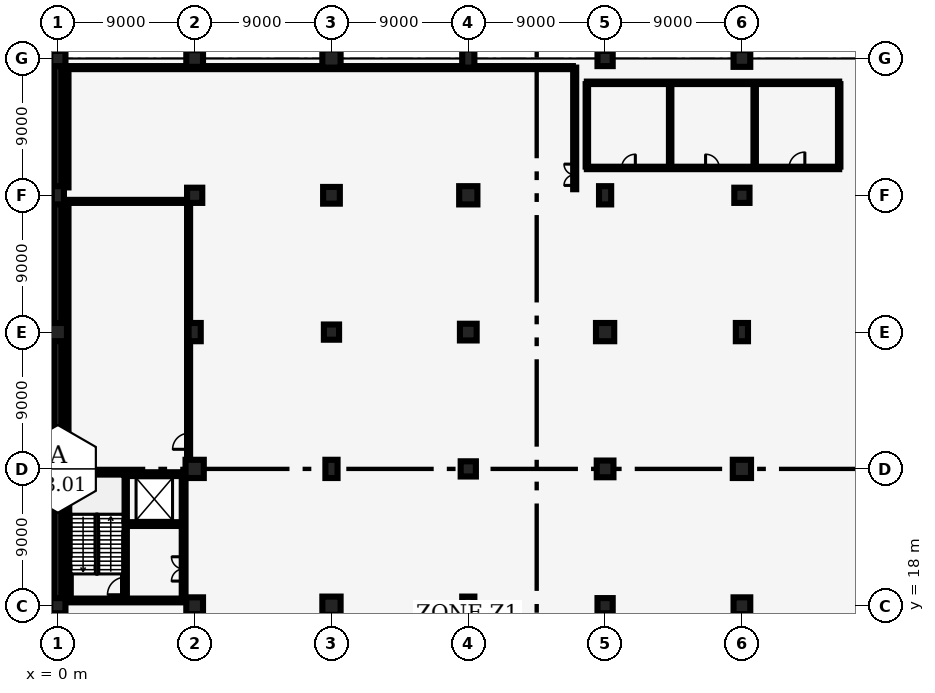
"""IFC4 building model, lengths in metres.
Left out: names, types, materials, properties, quantities, classifications, styles, units other than length and angle.
Written with IfcOpenShell. Run it as: python <this file> out.ifc"""

import sys

from ifc_helpers import new_model, si_unit, direction, frame, frame_2d, origin, origin_2d, place, context, subcontext, project, spatial, rectangle, extrude, element, fill, save


model = new_model("IFC4")
c1 = context("Model", 3, precision=1e-05, world=origin(), true_north=direction((0.0, 1.0)))
c2 = subcontext(c1, "Body", "Model", "MODEL_VIEW")
j1 = project(units=[si_unit("LENGTHUNIT", "METRE"), si_unit("PLANEANGLEUNIT", "RADIAN")], contexts=[c1])
p1 = place(None, origin())
s1 = spatial("IfcSite", under=j1, at=p1, CompositionType="ELEMENT")
p2 = place(p1, origin())
s2 = spatial("IfcBuilding", under=s1, at=p2, CompositionType="ELEMENT")
p3 = place(p2, frame((0.0, 0.0, -5.0)))
s3 = spatial("IfcBuildingStorey", under=s2, at=p3, CompositionType="ELEMENT", Elevation=-5.0)
p4 = place(p3, frame((0.0, 18.0, 0.0), z_axis=(0.0, 0.0, 1.0), x_axis=(1.0, 0.0, 0.0)))
e1 = element("IfcColumn", 1, at=p4, inside=s3, PredefinedType="COLUMN", context=c2, shape_type="SweptSolid", body=[
    extrude(rectangle(XDim=1.0, YDim=1.0, at=origin_2d()), origin(), (0.0, 0.0, 1.0), 5.0),
])
p5 = place(p3, frame((0.0, 27.0, 0.0), z_axis=(0.0, 0.0, 1.0), x_axis=(1.0, 0.0, 0.0)))
e2 = element("IfcColumn", 2, at=p5, inside=s3, PredefinedType="COLUMN", context=c2, shape_type="SweptSolid", body=[
    extrude(rectangle(XDim=1.1, YDim=1.1, at=origin_2d()), origin(), (0.0, 0.0, 1.0), 5.0),
])
p6 = place(p3, frame((0.0, 36.0, 0.0), z_axis=(0.0, 0.0, 1.0), x_axis=(1.0, 0.0, 0.0)))
e3 = element("IfcColumn", 3, at=p6, inside=s3, PredefinedType="COLUMN", context=c2, shape_type="SweptSolid", body=[
    extrude(rectangle(XDim=1.2, YDim=1.2, at=origin_2d()), origin(), (0.0, 0.0, 1.0), 5.0),
])
p7 = place(p3, frame((0.0, 45.0, 0.0), z_axis=(0.0, 0.0, 1.0), x_axis=(1.0, 0.0, 0.0)))
e4 = element("IfcColumn", 4, at=p7, inside=s3, PredefinedType="COLUMN", context=c2, shape_type="SweptSolid", body=[
    extrude(rectangle(XDim=0.8, YDim=1.2, at=origin_2d()), origin(), (0.0, 0.0, 1.0), 5.0),
])
p8 = place(p3, frame((0.0, 54.0, 0.0), z_axis=(0.0, 0.0, 1.0), x_axis=(1.0, 0.0, 0.0)))
e5 = element("IfcColumn", 5, at=p8, inside=s3, PredefinedType="COLUMN", context=c2, shape_type="SweptSolid", body=[
    extrude(rectangle(XDim=1.0, YDim=1.0, at=origin_2d()), origin(), (0.0, 0.0, 1.0), 5.0),
])
p9 = place(p3, frame((9.0, 18.0, 0.0), z_axis=(0.0, 0.0, 1.0), x_axis=(1.0, 0.0, 0.0)))
e6 = element("IfcColumn", 6, at=p9, inside=s3, PredefinedType="COLUMN", context=c2, shape_type="SweptSolid", body=[
    extrude(rectangle(XDim=1.1, YDim=1.1, at=origin_2d()), origin(), (0.0, 0.0, 1.0), 5.0),
])
p10 = place(p3, frame((9.0, 27.0, 0.0), z_axis=(0.0, 0.0, 1.0), x_axis=(1.0, 0.0, 0.0)))
e7 = element("IfcColumn", 7, at=p10, inside=s3, PredefinedType="COLUMN", context=c2, shape_type="SweptSolid", body=[
    extrude(rectangle(XDim=1.2, YDim=1.2, at=origin_2d()), origin(), (0.0, 0.0, 1.0), 5.0),
])
p11 = place(p3, frame((9.0, 36.0, 0.0), z_axis=(0.0, 0.0, 1.0), x_axis=(1.0, 0.0, 0.0)))
e8 = element("IfcColumn", 8, at=p11, inside=s3, PredefinedType="COLUMN", context=c2, shape_type="SweptSolid", body=[
    extrude(rectangle(XDim=0.8, YDim=1.2, at=origin_2d()), origin(), (0.0, 0.0, 1.0), 5.0),
])
p12 = place(p3, frame((9.0, 45.0, 0.0), z_axis=(0.0, 0.0, 1.0), x_axis=(1.0, 0.0, 0.0)))
e9 = element("IfcColumn", 9, at=p12, inside=s3, PredefinedType="COLUMN", context=c2, shape_type="SweptSolid", body=[
    extrude(rectangle(XDim=1.0, YDim=1.0, at=origin_2d()), origin(), (0.0, 0.0, 1.0), 5.0),
])
p13 = place(p3, frame((9.0, 54.0, 0.0), z_axis=(0.0, 0.0, 1.0), x_axis=(1.0, 0.0, 0.0)))
e10 = element("IfcColumn", 10, at=p13, inside=s3, PredefinedType="COLUMN", context=c2, shape_type="SweptSolid", body=[
    extrude(rectangle(XDim=1.1, YDim=1.1, at=origin_2d()), origin(), (0.0, 0.0, 1.0), 5.0),
])
p14 = place(p3, frame((18.0, 18.0, 0.0), z_axis=(0.0, 0.0, 1.0), x_axis=(1.0, 0.0, 0.0)))
e11 = element("IfcColumn", 11, at=p14, inside=s3, PredefinedType="COLUMN", context=c2, shape_type="SweptSolid", body=[
    extrude(rectangle(XDim=1.2, YDim=1.2, at=origin_2d()), origin(), (0.0, 0.0, 1.0), 5.0),
])
p15 = place(p3, frame((18.0, 27.0, 0.0), z_axis=(0.0, 0.0, 1.0), x_axis=(1.0, 0.0, 0.0)))
e12 = element("IfcColumn", 12, at=p15, inside=s3, PredefinedType="COLUMN", context=c2, shape_type="SweptSolid", body=[
    extrude(rectangle(XDim=0.8, YDim=1.2, at=origin_2d()), origin(), (0.0, 0.0, 1.0), 5.0),
])
p16 = place(p3, frame((18.0, 36.0, 0.0), z_axis=(0.0, 0.0, 1.0), x_axis=(1.0, 0.0, 0.0)))
e13 = element("IfcColumn", 13, at=p16, inside=s3, PredefinedType="COLUMN", context=c2, shape_type="SweptSolid", body=[
    extrude(rectangle(XDim=1.0, YDim=1.0, at=origin_2d()), origin(), (0.0, 0.0, 1.0), 5.0),
])
p17 = place(p3, frame((18.0, 45.0, 0.0), z_axis=(0.0, 0.0, 1.0), x_axis=(1.0, 0.0, 0.0)))
e14 = element("IfcColumn", 14, at=p17, inside=s3, PredefinedType="COLUMN", context=c2, shape_type="SweptSolid", body=[
    extrude(rectangle(XDim=1.1, YDim=1.1, at=origin_2d()), origin(), (0.0, 0.0, 1.0), 5.0),
])
p18 = place(p3, frame((18.0, 54.0, 0.0), z_axis=(0.0, 0.0, 1.0), x_axis=(1.0, 0.0, 0.0)))
e15 = element("IfcColumn", 15, at=p18, inside=s3, PredefinedType="COLUMN", context=c2, shape_type="SweptSolid", body=[
    extrude(rectangle(XDim=1.2, YDim=1.2, at=origin_2d()), origin(), (0.0, 0.0, 1.0), 5.0),
])
p19 = place(p3, frame((27.0, 18.0, 0.0), z_axis=(0.0, 0.0, 1.0), x_axis=(1.0, 0.0, 0.0)))
e16 = element("IfcColumn", 16, at=p19, inside=s3, PredefinedType="COLUMN", context=c2, shape_type="SweptSolid", body=[
    extrude(rectangle(XDim=0.8, YDim=1.2, at=origin_2d()), origin(), (0.0, 0.0, 1.0), 5.0),
])
p20 = place(p3, frame((27.0, 27.0, 0.0), z_axis=(0.0, 0.0, 1.0), x_axis=(1.0, 0.0, 0.0)))
e17 = element("IfcColumn", 17, at=p20, inside=s3, PredefinedType="COLUMN", context=c2, shape_type="SweptSolid", body=[
    extrude(rectangle(XDim=1.0, YDim=1.0, at=origin_2d()), origin(), (0.0, 0.0, 1.0), 4.66),
])
p21 = place(p3, frame((27.0, 36.0, 0.0), z_axis=(0.0, 0.0, 1.0), x_axis=(1.0, 0.0, 0.0)))
e18 = element("IfcColumn", 18, at=p21, inside=s3, PredefinedType="COLUMN", context=c2, shape_type="SweptSolid", body=[
    extrude(rectangle(XDim=1.1, YDim=1.1, at=origin_2d()), origin(), (0.0, 0.0, 1.0), 4.66),
])
p22 = place(p3, frame((27.0, 45.0, 0.0), z_axis=(0.0, 0.0, 1.0), x_axis=(1.0, 0.0, 0.0)))
e19 = element("IfcColumn", 19, at=p22, inside=s3, PredefinedType="COLUMN", context=c2, shape_type="SweptSolid", body=[
    extrude(rectangle(XDim=1.2, YDim=1.2, at=origin_2d()), origin(), (0.0, 0.0, 1.0), 5.0),
])
p23 = place(p3, frame((27.0, 54.0, 0.0), z_axis=(0.0, 0.0, 1.0), x_axis=(1.0, 0.0, 0.0)))
e20 = element("IfcColumn", 20, at=p23, inside=s3, PredefinedType="COLUMN", context=c2, shape_type="SweptSolid", body=[
    extrude(rectangle(XDim=0.8, YDim=1.2, at=origin_2d()), origin(), (0.0, 0.0, 1.0), 5.0),
])
p24 = place(p3, frame((36.0, 18.0, 0.0), z_axis=(0.0, 0.0, 1.0), x_axis=(1.0, 0.0, 0.0)))
e21 = element("IfcColumn", 21, at=p24, inside=s3, PredefinedType="COLUMN", context=c2, shape_type="SweptSolid", body=[
    extrude(rectangle(XDim=1.0, YDim=1.0, at=origin_2d()), origin(), (0.0, 0.0, 1.0), 5.0),
])
p25 = place(p3, frame((36.0, 27.0, 0.0), z_axis=(0.0, 0.0, 1.0), x_axis=(1.0, 0.0, 0.0)))
e22 = element("IfcColumn", 22, at=p25, inside=s3, PredefinedType="COLUMN", context=c2, shape_type="SweptSolid", body=[
    extrude(rectangle(XDim=1.1, YDim=1.1, at=origin_2d()), origin(), (0.0, 0.0, 1.0), 4.66),
])
p26 = place(p3, frame((36.0, 36.0, 0.0), z_axis=(0.0, 0.0, 1.0), x_axis=(1.0, 0.0, 0.0)))
e23 = element("IfcColumn", 23, at=p26, inside=s3, PredefinedType="COLUMN", context=c2, shape_type="SweptSolid", body=[
    extrude(rectangle(XDim=1.2, YDim=1.2, at=origin_2d()), origin(), (0.0, 0.0, 1.0), 4.66),
])
p27 = place(p3, frame((36.0, 45.0, 0.0), z_axis=(0.0, 0.0, 1.0), x_axis=(1.0, 0.0, 0.0)))
e24 = element("IfcColumn", 24, at=p27, inside=s3, PredefinedType="COLUMN", context=c2, shape_type="SweptSolid", body=[
    extrude(rectangle(XDim=0.8, YDim=1.2, at=origin_2d()), origin(), (0.0, 0.0, 1.0), 5.0),
])
p28 = place(p3, frame((36.0, 54.0, 0.0), z_axis=(0.0, 0.0, 1.0), x_axis=(1.0, 0.0, 0.0)))
e25 = element("IfcColumn", 25, at=p28, inside=s3, PredefinedType="COLUMN", context=c2, shape_type="SweptSolid", body=[
    extrude(rectangle(XDim=1.0, YDim=1.0, at=origin_2d()), origin(), (0.0, 0.0, 1.0), 5.0),
])
p29 = place(p3, frame((45.0, 18.0, 0.0), z_axis=(0.0, 0.0, 1.0), x_axis=(1.0, 0.0, 0.0)))
e26 = element("IfcColumn", 26, at=p29, inside=s3, PredefinedType="COLUMN", context=c2, shape_type="SweptSolid", body=[
    extrude(rectangle(XDim=1.1, YDim=1.1, at=origin_2d()), origin(), (0.0, 0.0, 1.0), 5.0),
])
p30 = place(p3, frame((45.0, 27.0, 0.0), z_axis=(0.0, 0.0, 1.0), x_axis=(1.0, 0.0, 0.0)))
e27 = element("IfcColumn", 27, at=p30, inside=s3, PredefinedType="COLUMN", context=c2, shape_type="SweptSolid", body=[
    extrude(rectangle(XDim=1.2, YDim=1.2, at=origin_2d()), origin(), (0.0, 0.0, 1.0), 4.66),
])
p31 = place(p3, frame((45.0, 36.0, 0.0), z_axis=(0.0, 0.0, 1.0), x_axis=(1.0, 0.0, 0.0)))
e28 = element("IfcColumn", 28, at=p31, inside=s3, PredefinedType="COLUMN", context=c2, shape_type="SweptSolid", body=[
    extrude(rectangle(XDim=0.8, YDim=1.2, at=origin_2d()), origin(), (0.0, 0.0, 1.0), 4.66),
])
p32 = place(p3, frame((45.0, 45.0, 0.0), z_axis=(0.0, 0.0, 1.0), x_axis=(1.0, 0.0, 0.0)))
e29 = element("IfcColumn", 29, at=p32, inside=s3, PredefinedType="COLUMN", context=c2, shape_type="SweptSolid", body=[
    extrude(rectangle(XDim=1.0, YDim=1.0, at=origin_2d()), origin(), (0.0, 0.0, 1.0), 5.0),
])
p33 = place(p3, frame((45.0, 54.0, 0.0), z_axis=(0.0, 0.0, 1.0), x_axis=(1.0, 0.0, 0.0)))
e30 = element("IfcColumn", 30, at=p33, inside=s3, PredefinedType="COLUMN", context=c2, shape_type="SweptSolid", body=[
    extrude(rectangle(XDim=1.1, YDim=1.1, at=origin_2d()), origin(), (0.0, 0.0, 1.0), 5.0),
])
p34 = place(p3, frame((0.0, 0.595, 0.0), z_axis=(0.0, 0.0, 1.0), x_axis=(0.0, 1.0, 0.0)))
e31 = element("IfcWall", 31, at=p34, inside=s3, PredefinedType="SHEAR", context=c2, shape_type="SweptSolid", body=[
    extrude(rectangle(XDim=52.91, YDim=0.45, at=frame_2d((26.455, 0.0))), origin(), (0.0, 0.0, 1.0), 3.95),
])
p35 = place(p3, frame((0.725, 18.47, 0.0), z_axis=(0.0, 0.0, 1.0), x_axis=(0.0, 1.0, 0.0)))
e32 = element("IfcWall", 32, at=p35, inside=s3, PredefinedType="SHEAR", context=c2, shape_type="SweptSolid", body=[
    extrude(rectangle(XDim=8.06, YDim=0.25, at=frame_2d((4.03, 0.0))), origin(), (0.0, 0.0, 1.0), 4.66),
])
p36 = place(p3, frame((8.275, 18.47, 0.0), z_axis=(0.0, 0.0, 1.0), x_axis=(0.0, 1.0, 0.0)))
e33 = element("IfcWall", 33, at=p36, inside=s3, PredefinedType="SHEAR", context=c2, shape_type="SweptSolid", body=[
    extrude(rectangle(XDim=8.06, YDim=0.25, at=frame_2d((4.03, 0.0))), origin(), (0.0, 0.0, 1.0), 4.66),
])
p37 = place(p36, frame((1.15, 0.0, 0.0)))
e34 = element("IfcOpeningElement", 34, at=p37, cuts=e33, PredefinedType="OPENING", context=c2, shape_type="SweptSolid", body=[
    extrude(rectangle(XDim=1.6, YDim=2.2, at=frame_2d((0.8, 1.1))), frame((0.0, 0.135, 0.0), z_axis=(0.0, -1.0, 0.0), x_axis=(1.0, 0.0, 0.0)), (0.0, 0.0, 1.0), 0.27),
])
for number, where, z_axis, x_axis in (
    (35, (0.6, 18.345, 0.0), (0.0, 0.0, 1.0), (1.0, 0.0, 0.0)),
    (36, (0.6, 26.655, 0.0), (0.0, 0.0, 1.0), (1.0, 0.0, 0.0)),
):
    element("IfcWall", number, at=place(p3, frame(where, z_axis=z_axis, x_axis=x_axis)), inside=s3, PredefinedType="SHEAR", context=c2, shape_type="SweptSolid", body=[
        extrude(rectangle(XDim=7.8, YDim=0.25, at=frame_2d((3.9, 0.0))), origin(), (0.0, 0.0, 1.0), 4.66),
    ])
p38 = place(p3, frame((4.415, 18.47, 0.0), z_axis=(0.0, 0.0, 1.0), x_axis=(0.0, 1.0, 0.0)))
e37 = element("IfcWall", 37, at=p38, inside=s3, PredefinedType="SHEAR", context=c2, shape_type="SweptSolid", body=[
    extrude(rectangle(XDim=8.06, YDim=0.25, at=frame_2d((4.03, 0.0))), origin(), (0.0, 0.0, 1.0), 4.66),
])
p39 = place(p38, frame((0.25, 0.0, 0.0)))
e38 = element("IfcOpeningElement", 38, at=p39, cuts=e37, PredefinedType="OPENING", context=c2, shape_type="SweptSolid", body=[
    extrude(rectangle(XDim=1.15, YDim=2.15, at=frame_2d((0.575, 1.075))), frame((0.0, 0.135, 0.0), z_axis=(0.0, -1.0, 0.0), x_axis=(1.0, 0.0, 0.0)), (0.0, 0.0, 1.0), 0.27),
])
p40 = place(p3, frame((4.54, 23.37, 0.0), z_axis=(0.0, 0.0, 1.0), x_axis=(1.0, 0.0, 0.0)))
e39 = element("IfcWall", 39, at=p40, inside=s3, PredefinedType="SHEAR", context=c2, shape_type="SweptSolid", body=[
    extrude(rectangle(XDim=3.61, YDim=0.25, at=frame_2d((1.805, 0.0))), origin(), (0.0, 0.0, 1.0), 4.66),
])
p41 = place(p40, frame((0.5, 0.0, 0.0)))
e40 = element("IfcOpeningElement", 40, at=p41, cuts=e39, PredefinedType="OPENING", context=c2, shape_type="SweptSolid", body=[
    extrude(rectangle(XDim=2.2, YDim=2.4, at=frame_2d((1.1, 1.2))), frame((0.0, 0.135, 0.0), z_axis=(0.0, -1.0, 0.0), x_axis=(1.0, 0.0, 0.0)), (0.0, 0.0, 1.0), 0.27),
])
p42 = place(p3, frame((34.8, 46.8, 0.0), z_axis=(0.0, 0.0, 1.0), x_axis=(1.0, 0.0, 0.0)))
e41 = element("IfcWall", 41, at=p42, inside=s3, PredefinedType="PLUMBINGWALL", context=c2, shape_type="SweptSolid", body=[
    extrude(rectangle(XDim=16.6, YDim=0.16, at=frame_2d((8.3, 0.0))), origin(), (0.0, 0.0, 1.0), 3.85),
])
p43 = place(p42, frame((2.29, 0.0, 0.0)))
e42 = element("IfcOpeningElement", 42, at=p43, cuts=e41, PredefinedType="OPENING", context=c2, shape_type="SweptSolid", body=[
    extrude(rectangle(XDim=0.9, YDim=2.1, at=frame_2d((0.45, 1.05))), frame((0.0, 0.09, 0.0), z_axis=(0.0, -1.0, 0.0), x_axis=(1.0, 0.0, 0.0)), (0.0, 0.0, 1.0), 0.18),
])
p44 = place(p42, frame((7.81, 0.0, 0.0)))
e43 = element("IfcOpeningElement", 43, at=p44, cuts=e41, PredefinedType="OPENING", context=c2, shape_type="SweptSolid", body=[
    extrude(rectangle(XDim=0.9, YDim=2.1, at=frame_2d((0.45, 1.05))), frame((0.0, 0.09, 0.0), z_axis=(0.0, -1.0, 0.0), x_axis=(1.0, 0.0, 0.0)), (0.0, 0.0, 1.0), 0.18),
])
p45 = place(p42, frame((13.3, 0.0, 0.0)))
e44 = element("IfcOpeningElement", 44, at=p45, cuts=e41, PredefinedType="OPENING", context=c2, shape_type="SweptSolid", body=[
    extrude(rectangle(XDim=1.04, YDim=2.15, at=frame_2d((0.52, 1.075))), frame((0.0, 0.09, 0.0), z_axis=(0.0, -1.0, 0.0), x_axis=(1.0, 0.0, 0.0)), (0.0, 0.0, 1.0), 0.18),
])
p46 = place(p3, frame((34.8, 52.4, 0.0), z_axis=(0.0, 0.0, 1.0), x_axis=(1.0, 0.0, 0.0)))
e45 = element("IfcWall", 45, at=p46, inside=s3, PredefinedType="PLUMBINGWALL", context=c2, shape_type="SweptSolid", body=[
    extrude(rectangle(XDim=16.6, YDim=0.16, at=frame_2d((8.3, 0.0))), origin(), (0.0, 0.0, 1.0), 3.85),
])
for number, where, z_axis, x_axis in (
    (46, (34.8, 46.888, 0.0), (0.0, 0.0, 1.0), (0.0, 1.0, 0.0)),
    (47, (40.28, 46.888, 0.0), (0.0, 0.0, 1.0), (0.0, 1.0, 0.0)),
    (48, (45.84, 46.888, 0.0), (0.0, 0.0, 1.0), (0.0, 1.0, 0.0)),
    (49, (51.4, 46.888, 0.0), (0.0, 0.0, 1.0), (0.0, 1.0, 0.0)),
):
    element("IfcWall", number, at=place(p3, frame(where, z_axis=z_axis, x_axis=x_axis)), inside=s3, PredefinedType="PLUMBINGWALL", context=c2, shape_type="SweptSolid", body=[
        extrude(rectangle(XDim=5.424, YDim=0.16, at=frame_2d((2.712, 0.0))), origin(), (0.0, 0.0, 1.0), 3.85),
    ])
p47 = place(p3, frame((8.6, 27.14, 0.0), z_axis=(0.0, 0.0, 1.0), x_axis=(0.0, 1.0, 0.0)))
e50 = element("IfcWall", 50, at=p47, inside=s3, PredefinedType="SOLIDWALL", context=c2, shape_type="SweptSolid", body=[
    extrude(rectangle(XDim=17.46, YDim=0.2, at=frame_2d((8.73, 0.0))), origin(), (0.0, 0.0, 1.0), 3.85),
])
p48 = place(p47, frame((1.15, 0.0, 0.0)))
e51 = element("IfcOpeningElement", 51, at=p48, cuts=e50, PredefinedType="OPENING", context=c2, shape_type="SweptSolid", body=[
    extrude(rectangle(XDim=1.05, YDim=2.15, at=frame_2d((0.525, 1.075))), frame((0.0, 0.11, 0.0), z_axis=(0.0, -1.0, 0.0), x_axis=(1.0, 0.0, 0.0)), (0.0, 0.0, 1.0), 0.22),
])
p49 = place(p3, frame((0.72, 44.6, 0.0), z_axis=(0.0, 0.0, 1.0), x_axis=(1.0, 0.0, 0.0)))
e52 = element("IfcWall", 52, at=p49, inside=s3, PredefinedType="SOLIDWALL", context=c2, shape_type="SweptSolid", body=[
    extrude(rectangle(XDim=7.76, YDim=0.2, at=frame_2d((3.88, 0.0))), origin(), (0.0, 0.0, 1.0), 3.85),
])
p50 = place(p3, frame((0.6, 27.26, 0.0), z_axis=(0.0, 0.0, 1.0), x_axis=(0.0, 1.0, 0.0)))
e53 = element("IfcWall", 53, at=p50, inside=s3, PredefinedType="SOLIDWALL", context=c2, shape_type="SweptSolid", body=[
    extrude(rectangle(XDim=17.22, YDim=0.2, at=frame_2d((8.61, 0.0))), origin(), (0.0, 0.0, 1.0), 3.85),
])
p51 = place(p3, frame((34.0, 45.4, 0.0), z_axis=(0.0, 0.0, 1.0), x_axis=(0.0, 1.0, 0.0)))
e54 = element("IfcWall", 54, at=p51, inside=s3, PredefinedType="SOLIDWALL", context=c2, shape_type="SweptSolid", body=[
    extrude(rectangle(XDim=8.0, YDim=0.2, at=frame_2d((4.0, 0.0))), origin(), (0.0, 0.0, 1.0), 3.85),
])
p52 = place(p51, frame((0.25, 0.0, 0.0)))
e55 = element("IfcOpeningElement", 55, at=p52, cuts=e54, PredefinedType="OPENING", context=c2, shape_type="SweptSolid", body=[
    extrude(rectangle(XDim=1.4, YDim=2.25, at=frame_2d((0.7, 1.125))), frame((0.0, 0.11, 0.0), z_axis=(0.0, -1.0, 0.0), x_axis=(1.0, 0.0, 0.0)), (0.0, 0.0, 1.0), 0.22),
])
p53 = place(p3, frame((0.72, 53.4, 0.0), z_axis=(0.0, 0.0, 1.0), x_axis=(1.0, 0.0, 0.0)))
e56 = element("IfcWall", 56, at=p53, inside=s3, PredefinedType="SOLIDWALL", context=c2, shape_type="SweptSolid", body=[
    extrude(rectangle(XDim=33.16, YDim=0.2, at=frame_2d((16.58, 0.0))), origin(), (0.0, 0.0, 1.0), 3.85),
])
p54 = place(p3, frame((0.6, 45.52, 0.0), z_axis=(0.0, 0.0, 1.0), x_axis=(0.0, 1.0, 0.0)))
e57 = element("IfcWall", 57, at=p54, inside=s3, PredefinedType="SOLIDWALL", context=c2, shape_type="SweptSolid", body=[
    extrude(rectangle(XDim=7.76, YDim=0.2, at=frame_2d((3.88, 0.0))), origin(), (0.0, 0.0, 1.0), 3.85),
])
p55 = place(p39, origin())
e58 = element("IfcDoor", 58, at=p55, inside=s3, OperationType="SINGLE_SWING_LEFT", PredefinedType="DOOR", context=c2, shape_type="SweptSolid", body=[
    extrude(rectangle(XDim=1.15, YDim=2.15, at=frame_2d((0.575, 1.075))), frame((0.0, 0.025, 0.0), z_axis=(0.0, -1.0, 0.0), x_axis=(1.0, 0.0, 0.0)), (0.0, 0.0, 1.0), 0.05),
])
fill(e38, e58)
p56 = place(p41, origin())
e59 = element("IfcDoor", 59, at=p56, inside=s3, OperationType="DOUBLE_DOOR_SLIDING", PredefinedType="DOOR", context=c2, shape_type="SweptSolid", body=[
    extrude(rectangle(XDim=2.2, YDim=2.4, at=frame_2d((1.1, 1.2))), frame((0.0, 0.025, 0.0), z_axis=(0.0, -1.0, 0.0), x_axis=(1.0, 0.0, 0.0)), (0.0, 0.0, 1.0), 0.05),
])
fill(e40, e59)
p57 = place(p37, origin())
e60 = element("IfcDoor", 60, at=p57, inside=s3, OperationType="DOUBLE_DOOR_SINGLE_SWING", PredefinedType="DOOR", context=c2, shape_type="SweptSolid", body=[
    extrude(rectangle(XDim=1.6, YDim=2.2, at=frame_2d((0.8, 1.1))), frame((0.0, 0.025, 0.0), z_axis=(0.0, -1.0, 0.0), x_axis=(1.0, 0.0, 0.0)), (0.0, 0.0, 1.0), 0.05),
])
fill(e34, e60)
p58 = place(p43, origin())
e61 = element("IfcDoor", 61, at=p58, inside=s3, OperationType="SINGLE_SWING_RIGHT", PredefinedType="DOOR", context=c2, shape_type="SweptSolid", body=[
    extrude(rectangle(XDim=0.9, YDim=2.1, at=frame_2d((0.45, 1.05))), frame((0.0, 0.025, 0.0), z_axis=(0.0, -1.0, 0.0), x_axis=(1.0, 0.0, 0.0)), (0.0, 0.0, 1.0), 0.05),
])
fill(e42, e61)
p59 = place(p44, origin())
e62 = element("IfcDoor", 62, at=p59, inside=s3, OperationType="SINGLE_SWING_LEFT", PredefinedType="DOOR", context=c2, shape_type="SweptSolid", body=[
    extrude(rectangle(XDim=0.9, YDim=2.1, at=frame_2d((0.45, 1.05))), frame((0.0, 0.025, 0.0), z_axis=(0.0, -1.0, 0.0), x_axis=(1.0, 0.0, 0.0)), (0.0, 0.0, 1.0), 0.05),
])
fill(e43, e62)
p60 = place(p45, origin())
e63 = element("IfcDoor", 63, at=p60, inside=s3, OperationType="SINGLE_SWING_RIGHT", PredefinedType="DOOR", context=c2, shape_type="SweptSolid", body=[
    extrude(rectangle(XDim=1.04, YDim=2.15, at=frame_2d((0.52, 1.075))), frame((0.0, 0.025, 0.0), z_axis=(0.0, -1.0, 0.0), x_axis=(1.0, 0.0, 0.0)), (0.0, 0.0, 1.0), 0.05),
])
fill(e44, e63)
p61 = place(p48, origin())
e64 = element("IfcDoor", 64, at=p61, inside=s3, OperationType="SINGLE_SWING_LEFT", PredefinedType="DOOR", context=c2, shape_type="SweptSolid", body=[
    extrude(rectangle(XDim=1.05, YDim=2.15, at=frame_2d((0.525, 1.075))), frame((0.0, 0.025, 0.0), z_axis=(0.0, -1.0, 0.0), x_axis=(1.0, 0.0, 0.0)), (0.0, 0.0, 1.0), 0.05),
])
fill(e51, e64)
p62 = place(p52, origin())
e65 = element("IfcDoor", 65, at=p62, inside=s3, OperationType="DOUBLE_DOOR_SINGLE_SWING", PredefinedType="DOOR", context=c2, shape_type="SweptSolid", body=[
    extrude(rectangle(XDim=1.4, YDim=2.25, at=frame_2d((0.7, 1.125))), frame((0.0, 0.025, 0.0), z_axis=(0.0, -1.0, 0.0), x_axis=(1.0, 0.0, 0.0)), (0.0, 0.0, 1.0), 0.05),
])
fill(e55, e65)
save(model, sys.argv[1])
